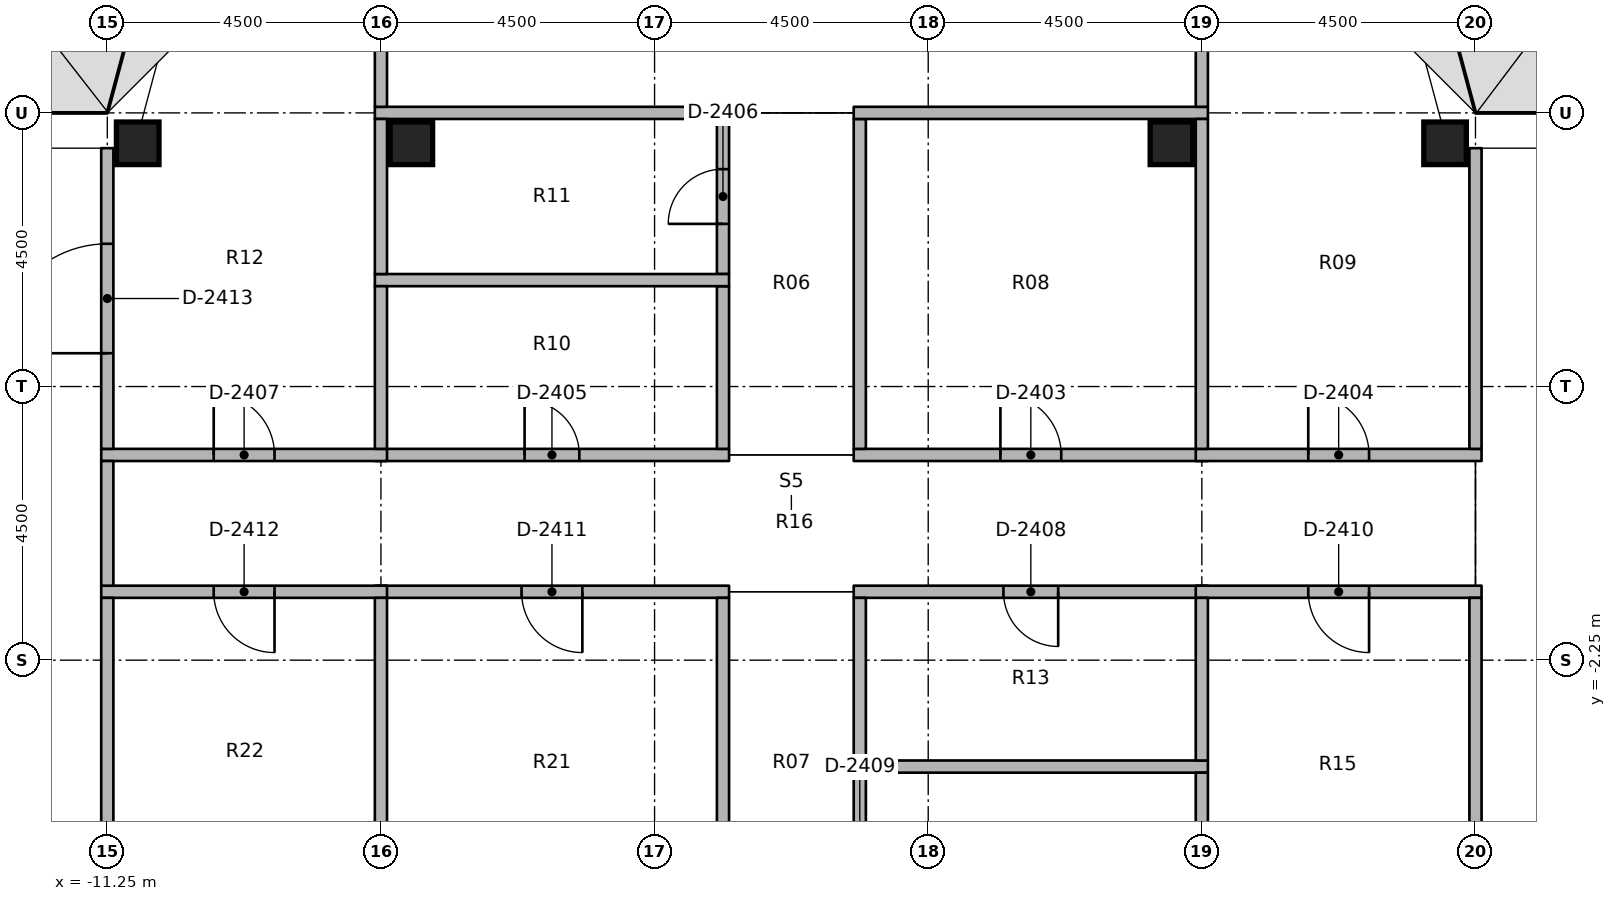
"""IFC4 building model, lengths in metres.
Left out: names, types, materials, properties, quantities, classifications, styles, units other than length and angle.
Written with IfcOpenShell. Run it as: python <this file> out.ifc"""

import sys

from ifc_helpers import new_model, si_unit, direction, frame, frame_2d, origin, origin_2d, place, context, subcontext, project, spatial, rectangle, extrude, element, fill, save


model = new_model("IFC4")
c1 = context("Model", 3, precision=1e-05, world=origin(), true_north=direction((0.0, 1.0)))
c2 = subcontext(c1, "Body", "Model", "MODEL_VIEW")
j1 = project(units=[si_unit("LENGTHUNIT", "METRE"), si_unit("PLANEANGLEUNIT", "RADIAN")], contexts=[c1])
p1 = place(None, origin())
s1 = spatial("IfcSite", under=j1, at=p1, CompositionType="ELEMENT")
p2 = place(p1, origin())
s2 = spatial("IfcBuilding", under=s1, at=p2, CompositionType="ELEMENT")
p3 = place(p2, frame((0.0, 0.0, 222.0)))
s3 = spatial("IfcBuildingStorey", under=s2, at=p3, CompositionType="ELEMENT", Elevation=222.0)
for number, where, z_axis, x_axis in (
    (1, (-10.75, 6.25, 0.0), (0.0, 0.0, 1.0), (1.0, 0.0, 0.0)),
    (2, (-6.25, 6.25, 0.0), (0.0, 0.0, 1.0), (1.0, 0.0, 0.0)),
    (3, (6.25, 6.25, 0.0), (0.0, 0.0, 1.0), (1.0, 0.0, 0.0)),
    (4, (10.75, 6.25, 0.0), (0.0, 0.0, 1.0), (1.0, 0.0, 0.0)),
):
    element("IfcColumn", number, at=place(p3, frame(where, z_axis=z_axis, x_axis=x_axis)), inside=s3, PredefinedType="COLUMN", context=c2, shape_type="SweptSolid", body=[
        extrude(rectangle(XDim=0.7, YDim=0.7, at=origin_2d()), origin(), (0.0, 0.0, 1.0), 3.65),
    ])
p4 = place(p3, frame((1.025, 1.125, 0.0), z_axis=(0.0, 0.0, 1.0), x_axis=(1.0, 0.0, 0.0)))
e5 = element("IfcWall", 5, at=p4, inside=s3, PredefinedType="PARTITIONING", context=c2, shape_type="SweptSolid", body=[
    extrude(rectangle(XDim=5.825, YDim=0.2, at=frame_2d((2.913, 0.0))), origin(), (0.0, 0.0, 1.0), 2.75),
])
p5 = place(p4, frame((2.413, 0.0, 0.0)))
e6 = element("IfcOpeningElement", 6, at=p5, cuts=e5, PredefinedType="OPENING", context=c2, shape_type="SweptSolid", body=[
    extrude(rectangle(XDim=1.0, YDim=2.1, at=frame_2d((0.5, 1.05))), frame((0.0, 0.11, 0.0), z_axis=(0.0, -1.0, 0.0), x_axis=(1.0, 0.0, 0.0)), (0.0, 0.0, 1.0), 0.22),
])
p6 = place(p3, frame((6.65, 1.125, 0.0), z_axis=(0.0, 0.0, 1.0), x_axis=(1.0, 0.0, 0.0)))
e7 = element("IfcWall", 7, at=p6, inside=s3, PredefinedType="PARTITIONING", context=c2, shape_type="SweptSolid", body=[
    extrude(rectangle(XDim=4.7, YDim=0.2, at=frame_2d((2.35, 0.0))), origin(), (0.0, 0.0, 1.0), 2.75),
])
p7 = place(p6, frame((1.85, 0.0, 0.0)))
e8 = element("IfcOpeningElement", 8, at=p7, cuts=e7, PredefinedType="OPENING", context=c2, shape_type="SweptSolid", body=[
    extrude(rectangle(XDim=1.0, YDim=2.1, at=frame_2d((0.5, 1.05))), frame((0.0, 0.11, 0.0), z_axis=(0.0, -1.0, 0.0), x_axis=(1.0, 0.0, 0.0)), (0.0, 0.0, 1.0), 0.22),
])
p8 = place(p3, frame((-6.85, 1.125, 0.0), z_axis=(0.0, 0.0, 1.0), x_axis=(1.0, 0.0, 0.0)))
e9 = element("IfcWall", 9, at=p8, inside=s3, PredefinedType="PARTITIONING", context=c2, shape_type="SweptSolid", body=[
    extrude(rectangle(XDim=5.825, YDim=0.2, at=frame_2d((2.913, 0.0))), origin(), (0.0, 0.0, 1.0), 2.75),
])
p9 = place(p8, frame((2.462, 0.0, 0.0)))
e10 = element("IfcOpeningElement", 10, at=p9, cuts=e9, PredefinedType="OPENING", context=c2, shape_type="SweptSolid", body=[
    extrude(rectangle(XDim=0.9, YDim=2.1, at=frame_2d((0.45, 1.05))), frame((0.0, 0.11, 0.0), z_axis=(0.0, -1.0, 0.0), x_axis=(1.0, 0.0, 0.0)), (0.0, 0.0, 1.0), 0.22),
])
p10 = place(p3, frame((-11.35, 1.125, 0.0), z_axis=(0.0, 0.0, 1.0), x_axis=(1.0, 0.0, 0.0)))
e11 = element("IfcWall", 11, at=p10, inside=s3, PredefinedType="PARTITIONING", context=c2, shape_type="SweptSolid", body=[
    extrude(rectangle(XDim=4.7, YDim=0.2, at=frame_2d((2.35, 0.0))), origin(), (0.0, 0.0, 1.0), 2.75),
])
p11 = place(p10, frame((1.85, 0.0, 0.0)))
e12 = element("IfcOpeningElement", 12, at=p11, cuts=e11, PredefinedType="OPENING", context=c2, shape_type="SweptSolid", body=[
    extrude(rectangle(XDim=1.0, YDim=2.1, at=frame_2d((0.5, 1.05))), frame((0.0, 0.11, 0.0), z_axis=(0.0, -1.0, 0.0), x_axis=(1.0, 0.0, 0.0)), (0.0, 0.0, 1.0), 0.22),
])
p12 = place(p3, frame((6.85, -1.125, 0.0), z_axis=(0.0, 0.0, 1.0), x_axis=(-1.0, 0.0, 0.0)))
e13 = element("IfcWall", 13, at=p12, inside=s3, PredefinedType="PARTITIONING", context=c2, shape_type="SweptSolid", body=[
    extrude(rectangle(XDim=5.825, YDim=0.2, at=frame_2d((2.913, 0.0))), origin(), (0.0, 0.0, 1.0), 2.75),
])
p13 = place(p12, frame((2.462, 0.0, 0.0)))
e14 = element("IfcOpeningElement", 14, at=p13, cuts=e13, PredefinedType="OPENING", context=c2, shape_type="SweptSolid", body=[
    extrude(rectangle(XDim=0.9, YDim=2.1, at=frame_2d((0.45, 1.05))), frame((0.0, 0.11, 0.0), z_axis=(0.0, -1.0, 0.0), x_axis=(1.0, 0.0, 0.0)), (0.0, 0.0, 1.0), 0.22),
])
p14 = place(p3, frame((11.35, -1.125, 0.0), z_axis=(0.0, 0.0, 1.0), x_axis=(-1.0, 0.0, 0.0)))
e15 = element("IfcWall", 15, at=p14, inside=s3, PredefinedType="PARTITIONING", context=c2, shape_type="SweptSolid", body=[
    extrude(rectangle(XDim=4.7, YDim=0.2, at=frame_2d((2.35, 0.0))), origin(), (0.0, 0.0, 1.0), 2.75),
])
p15 = place(p14, frame((1.85, 0.0, 0.0)))
e16 = element("IfcOpeningElement", 16, at=p15, cuts=e15, PredefinedType="OPENING", context=c2, shape_type="SweptSolid", body=[
    extrude(rectangle(XDim=1.0, YDim=2.1, at=frame_2d((0.5, 1.05))), frame((0.0, 0.11, 0.0), z_axis=(0.0, -1.0, 0.0), x_axis=(1.0, 0.0, 0.0)), (0.0, 0.0, 1.0), 0.22),
])
p16 = place(p3, frame((-1.025, -1.125, 0.0), z_axis=(0.0, 0.0, 1.0), x_axis=(-1.0, 0.0, 0.0)))
e17 = element("IfcWall", 17, at=p16, inside=s3, PredefinedType="PARTITIONING", context=c2, shape_type="SweptSolid", body=[
    extrude(rectangle(XDim=5.825, YDim=0.2, at=frame_2d((2.913, 0.0))), origin(), (0.0, 0.0, 1.0), 2.75),
])
p17 = place(p16, frame((2.413, 0.0, 0.0)))
e18 = element("IfcOpeningElement", 18, at=p17, cuts=e17, PredefinedType="OPENING", context=c2, shape_type="SweptSolid", body=[
    extrude(rectangle(XDim=1.0, YDim=2.1, at=frame_2d((0.5, 1.05))), frame((0.0, 0.11, 0.0), z_axis=(0.0, -1.0, 0.0), x_axis=(1.0, 0.0, 0.0)), (0.0, 0.0, 1.0), 0.22),
])
p18 = place(p3, frame((-6.65, -1.125, 0.0), z_axis=(0.0, 0.0, 1.0), x_axis=(-1.0, 0.0, 0.0)))
e19 = element("IfcWall", 19, at=p18, inside=s3, PredefinedType="PARTITIONING", context=c2, shape_type="SweptSolid", body=[
    extrude(rectangle(XDim=4.7, YDim=0.2, at=frame_2d((2.35, 0.0))), origin(), (0.0, 0.0, 1.0), 2.75),
])
p19 = place(p18, frame((1.85, 0.0, 0.0)))
e20 = element("IfcOpeningElement", 20, at=p19, cuts=e19, PredefinedType="OPENING", context=c2, shape_type="SweptSolid", body=[
    extrude(rectangle(XDim=1.0, YDim=2.1, at=frame_2d((0.5, 1.05))), frame((0.0, 0.11, 0.0), z_axis=(0.0, -1.0, 0.0), x_axis=(1.0, 0.0, 0.0)), (0.0, 0.0, 1.0), 0.22),
])
p20 = place(p3, frame((-11.25, -1.025, 0.0), z_axis=(0.0, 0.0, 1.0), x_axis=(0.0, 1.0, 0.0)))
e21 = element("IfcWall", 21, at=p20, inside=s3, PredefinedType="PARTITIONING", context=c2, shape_type="SweptSolid", body=[
    extrude(rectangle(XDim=2.05, YDim=0.2, at=frame_2d((1.025, 0.0))), origin(), (0.0, 0.0, 1.0), 2.75),
])
p21 = place(p3, frame((1.125, 1.225, 0.0), z_axis=(0.0, 0.0, 1.0), x_axis=(0.0, 1.0, 0.0)))
e22 = element("IfcWall", 22, at=p21, inside=s3, PredefinedType="PARTITIONING", context=c2, shape_type="SweptSolid", body=[
    extrude(rectangle(XDim=5.425, YDim=0.2, at=frame_2d((2.712, 0.0))), origin(), (0.0, 0.0, 1.0), 2.75),
])
p22 = place(p3, frame((-1.125, 1.225, 0.0), z_axis=(0.0, 0.0, 1.0), x_axis=(0.0, 1.0, 0.0)))
e23 = element("IfcWall", 23, at=p22, inside=s3, PredefinedType="PARTITIONING", context=c2, shape_type="SweptSolid", body=[
    extrude(rectangle(XDim=2.675, YDim=0.2, at=frame_2d((1.337, 0.0))), origin(), (0.0, 0.0, 1.0), 2.75),
])
p23 = place(p3, frame((-1.125, 4.1, 0.0), z_axis=(0.0, 0.0, 1.0), x_axis=(0.0, 1.0, 0.0)))
e24 = element("IfcWall", 24, at=p23, inside=s3, PredefinedType="PARTITIONING", context=c2, shape_type="SweptSolid", body=[
    extrude(rectangle(XDim=2.55, YDim=0.2, at=frame_2d((1.275, 0.0))), origin(), (0.0, 0.0, 1.0), 2.75),
])
p24 = place(p23, frame((0.825, 0.0, 0.0)))
e25 = element("IfcOpeningElement", 25, at=p24, cuts=e24, PredefinedType="OPENING", context=c2, shape_type="SweptSolid", body=[
    extrude(rectangle(XDim=0.9, YDim=2.1, at=frame_2d((0.45, 1.05))), frame((0.0, 0.11, 0.0), z_axis=(0.0, -1.0, 0.0), x_axis=(1.0, 0.0, 0.0)), (0.0, 0.0, 1.0), 0.22),
])
p25 = place(p3, frame((1.125, -3.9, 0.0), z_axis=(0.0, 0.0, 1.0), x_axis=(0.0, 1.0, 0.0)))
e26 = element("IfcWall", 26, at=p25, inside=s3, PredefinedType="PARTITIONING", context=c2, shape_type="SweptSolid", body=[
    extrude(rectangle(XDim=2.675, YDim=0.2, at=frame_2d((1.337, 0.0))), origin(), (0.0, 0.0, 1.0), 2.75),
])
p26 = place(p3, frame((1.125, -4.1, 0.0), z_axis=(0.0, 0.0, 1.0), x_axis=(0.0, -1.0, 0.0)))
e27 = element("IfcWall", 27, at=p26, inside=s3, PredefinedType="PARTITIONING", context=c2, shape_type="SweptSolid", body=[
    extrude(rectangle(XDim=2.55, YDim=0.2, at=frame_2d((1.275, 0.0))), origin(), (0.0, 0.0, 1.0), 2.75),
])
p27 = place(p26, frame((0.825, 0.0, 0.0)))
e28 = element("IfcOpeningElement", 28, at=p27, cuts=e27, PredefinedType="OPENING", context=c2, shape_type="SweptSolid", body=[
    extrude(rectangle(XDim=0.9, YDim=2.1, at=frame_2d((0.45, 1.05))), frame((0.0, 0.11, 0.0), z_axis=(0.0, -1.0, 0.0), x_axis=(1.0, 0.0, 0.0)), (0.0, 0.0, 1.0), 0.22),
])
p28 = place(p3, frame((-1.125, -6.65, 0.0), z_axis=(0.0, 0.0, 1.0), x_axis=(0.0, 1.0, 0.0)))
e29 = element("IfcWall", 29, at=p28, inside=s3, PredefinedType="PARTITIONING", context=c2, shape_type="SweptSolid", body=[
    extrude(rectangle(XDim=5.425, YDim=0.2, at=frame_2d((2.712, 0.0))), origin(), (0.0, 0.0, 1.0), 2.75),
])
p29 = place(p3, frame((1.025, 6.75, 0.0), z_axis=(0.0, 0.0, 1.0), x_axis=(1.0, 0.0, 0.0)))
e30 = element("IfcWall", 30, at=p29, inside=s3, PredefinedType="PARTITIONING", context=c2, shape_type="SweptSolid", body=[
    extrude(rectangle(XDim=5.825, YDim=0.2, at=frame_2d((2.913, 0.0))), origin(), (0.0, 0.0, 1.0), 2.75),
])
p30 = place(p3, frame((6.75, 6.85, 0.0), z_axis=(0.0, 0.0, 1.0), x_axis=(0.0, 1.0, 0.0)))
e31 = element("IfcWall", 31, at=p30, inside=s3, PredefinedType="PARTITIONING", context=c2, shape_type="SweptSolid", body=[
    extrude(rectangle(XDim=3.78, YDim=0.2, at=frame_2d((1.89, 0.0))), origin(), (0.0, 0.0, 1.0), 2.75),
])
p31 = place(p3, frame((-6.85, 6.75, 0.0), z_axis=(0.0, 0.0, 1.0), x_axis=(1.0, 0.0, 0.0)))
e32 = element("IfcWall", 32, at=p31, inside=s3, PredefinedType="PARTITIONING", context=c2, shape_type="SweptSolid", body=[
    extrude(rectangle(XDim=5.825, YDim=0.2, at=frame_2d((2.913, 0.0))), origin(), (0.0, 0.0, 1.0), 2.75),
])
p32 = place(p3, frame((-6.75, 6.85, 0.0), z_axis=(0.0, 0.0, 1.0), x_axis=(0.0, 1.0, 0.0)))
e33 = element("IfcWall", 33, at=p32, inside=s3, PredefinedType="PARTITIONING", context=c2, shape_type="SweptSolid", body=[
    extrude(rectangle(XDim=3.78, YDim=0.2, at=frame_2d((1.89, 0.0))), origin(), (0.0, 0.0, 1.0), 2.75),
])
p33 = place(p3, frame((6.75, 1.225, 0.0), z_axis=(0.0, 0.0, 1.0), x_axis=(0.0, 1.0, 0.0)))
e34 = element("IfcWall", 34, at=p33, inside=s3, PredefinedType="PARTITIONING", context=c2, shape_type="SweptSolid", body=[
    extrude(rectangle(XDim=5.425, YDim=0.2, at=frame_2d((2.712, 0.0))), origin(), (0.0, 0.0, 1.0), 2.75),
])
p34 = place(p3, frame((11.25, 1.225, 0.0), z_axis=(0.0, 0.0, 1.0), x_axis=(0.0, 1.0, 0.0)))
e35 = element("IfcWall", 35, at=p34, inside=s3, PredefinedType="PARTITIONING", context=c2, shape_type="SweptSolid", body=[
    extrude(rectangle(XDim=4.945, YDim=0.2, at=frame_2d((2.472, 0.0))), origin(), (0.0, 0.0, 1.0), 2.75),
])
p35 = place(p3, frame((-6.85, 4.0, 0.0), z_axis=(0.0, 0.0, 1.0), x_axis=(1.0, 0.0, 0.0)))
e36 = element("IfcWall", 36, at=p35, inside=s3, PredefinedType="PARTITIONING", context=c2, shape_type="SweptSolid", body=[
    extrude(rectangle(XDim=5.825, YDim=0.2, at=frame_2d((2.913, 0.0))), origin(), (0.0, 0.0, 1.0), 2.75),
])
p36 = place(p3, frame((-6.75, 1.225, 0.0), z_axis=(0.0, 0.0, 1.0), x_axis=(0.0, 1.0, 0.0)))
e37 = element("IfcWall", 37, at=p36, inside=s3, PredefinedType="PARTITIONING", context=c2, shape_type="SweptSolid", body=[
    extrude(rectangle(XDim=2.675, YDim=0.2, at=frame_2d((1.337, 0.0))), origin(), (0.0, 0.0, 1.0), 2.75),
])
p37 = place(p3, frame((-6.75, 4.1, 0.0), z_axis=(0.0, 0.0, 1.0), x_axis=(0.0, 1.0, 0.0)))
e38 = element("IfcWall", 38, at=p37, inside=s3, PredefinedType="PARTITIONING", context=c2, shape_type="SweptSolid", body=[
    extrude(rectangle(XDim=2.55, YDim=0.2, at=frame_2d((1.275, 0.0))), origin(), (0.0, 0.0, 1.0), 2.75),
])
p38 = place(p3, frame((-11.25, 1.225, 0.0), z_axis=(0.0, 0.0, 1.0), x_axis=(0.0, 1.0, 0.0)))
e39 = element("IfcWall", 39, at=p38, inside=s3, PredefinedType="PARTITIONING", context=c2, shape_type="SweptSolid", body=[
    extrude(rectangle(XDim=4.945, YDim=0.2, at=frame_2d((2.472, 0.0))), origin(), (0.0, 0.0, 1.0), 2.75),
])
p39 = place(p38, frame((1.573, 0.0, 0.0)))
e40 = element("IfcOpeningElement", 40, at=p39, cuts=e39, PredefinedType="OPENING", context=c2, shape_type="SweptSolid", body=[
    extrude(rectangle(XDim=1.8, YDim=2.1, at=frame_2d((0.9, 1.05))), frame((0.0, 0.11, 0.0), z_axis=(0.0, -1.0, 0.0), x_axis=(1.0, 0.0, 0.0)), (0.0, 0.0, 1.0), 0.22),
])
p40 = place(p3, frame((1.025, -4.0, 0.0), z_axis=(0.0, 0.0, 1.0), x_axis=(1.0, 0.0, 0.0)))
e41 = element("IfcWall", 41, at=p40, inside=s3, PredefinedType="PARTITIONING", context=c2, shape_type="SweptSolid", body=[
    extrude(rectangle(XDim=5.825, YDim=0.2, at=frame_2d((2.913, 0.0))), origin(), (0.0, 0.0, 1.0), 2.75),
])
p41 = place(p3, frame((6.75, -3.9, 0.0), z_axis=(0.0, 0.0, 1.0), x_axis=(0.0, 1.0, 0.0)))
e42 = element("IfcWall", 42, at=p41, inside=s3, PredefinedType="PARTITIONING", context=c2, shape_type="SweptSolid", body=[
    extrude(rectangle(XDim=2.675, YDim=0.2, at=frame_2d((1.337, 0.0))), origin(), (0.0, 0.0, 1.0), 2.75),
])
p42 = place(p3, frame((6.75, -6.65, 0.0), z_axis=(0.0, 0.0, 1.0), x_axis=(0.0, 1.0, 0.0)))
e43 = element("IfcWall", 43, at=p42, inside=s3, PredefinedType="PARTITIONING", context=c2, shape_type="SweptSolid", body=[
    extrude(rectangle(XDim=2.55, YDim=0.2, at=frame_2d((1.275, 0.0))), origin(), (0.0, 0.0, 1.0), 2.75),
])
p43 = place(p3, frame((11.25, -6.17, 0.0), z_axis=(0.0, 0.0, 1.0), x_axis=(0.0, 1.0, 0.0)))
e44 = element("IfcWall", 44, at=p43, inside=s3, PredefinedType="PARTITIONING", context=c2, shape_type="SweptSolid", body=[
    extrude(rectangle(XDim=4.945, YDim=0.2, at=frame_2d((2.472, 0.0))), origin(), (0.0, 0.0, 1.0), 2.75),
])
p44 = place(p3, frame((-6.75, -6.65, 0.0), z_axis=(0.0, 0.0, 1.0), x_axis=(0.0, 1.0, 0.0)))
e45 = element("IfcWall", 45, at=p44, inside=s3, PredefinedType="PARTITIONING", context=c2, shape_type="SweptSolid", body=[
    extrude(rectangle(XDim=5.425, YDim=0.2, at=frame_2d((2.712, 0.0))), origin(), (0.0, 0.0, 1.0), 2.75),
])
p45 = place(p3, frame((-11.25, -6.17, 0.0), z_axis=(0.0, 0.0, 1.0), x_axis=(0.0, 1.0, 0.0)))
e46 = element("IfcWall", 46, at=p45, inside=s3, PredefinedType="PARTITIONING", context=c2, shape_type="SweptSolid", body=[
    extrude(rectangle(XDim=4.945, YDim=0.2, at=frame_2d((2.472, 0.0))), origin(), (0.0, 0.0, 1.0), 2.75),
])
p46 = place(p5, origin())
e47 = element("IfcDoor", 47, at=p46, inside=s3, OperationType="SINGLE_SWING_RIGHT", PredefinedType="DOOR", context=c2, shape_type="SweptSolid", body=[
    extrude(rectangle(XDim=1.0, YDim=2.1, at=frame_2d((0.5, 1.05))), frame((0.0, 0.025, 0.0), z_axis=(0.0, -1.0, 0.0), x_axis=(1.0, 0.0, 0.0)), (0.0, 0.0, 1.0), 0.05),
])
fill(e6, e47)
p47 = place(p7, origin())
e48 = element("IfcDoor", 48, at=p47, inside=s3, OperationType="SINGLE_SWING_RIGHT", PredefinedType="DOOR", context=c2, shape_type="SweptSolid", body=[
    extrude(rectangle(XDim=1.0, YDim=2.1, at=frame_2d((0.5, 1.05))), frame((0.0, 0.025, 0.0), z_axis=(0.0, -1.0, 0.0), x_axis=(1.0, 0.0, 0.0)), (0.0, 0.0, 1.0), 0.05),
])
fill(e8, e48)
p48 = place(p9, origin())
e49 = element("IfcDoor", 49, at=p48, inside=s3, OperationType="SINGLE_SWING_RIGHT", PredefinedType="DOOR", context=c2, shape_type="SweptSolid", body=[
    extrude(rectangle(XDim=0.9, YDim=2.1, at=frame_2d((0.45, 1.05))), frame((0.0, 0.025, 0.0), z_axis=(0.0, -1.0, 0.0), x_axis=(1.0, 0.0, 0.0)), (0.0, 0.0, 1.0), 0.05),
])
fill(e10, e49)
p49 = place(p24, origin())
e50 = element("IfcDoor", 50, at=p49, inside=s3, OperationType="SINGLE_SWING_RIGHT", PredefinedType="DOOR", context=c2, shape_type="SweptSolid", body=[
    extrude(rectangle(XDim=0.9, YDim=2.1, at=frame_2d((0.45, 1.05))), frame((0.0, 0.025, 0.0), z_axis=(0.0, -1.0, 0.0), x_axis=(1.0, 0.0, 0.0)), (0.0, 0.0, 1.0), 0.05),
])
fill(e25, e50)
p50 = place(p11, origin())
e51 = element("IfcDoor", 51, at=p50, inside=s3, OperationType="SINGLE_SWING_RIGHT", PredefinedType="DOOR", context=c2, shape_type="SweptSolid", body=[
    extrude(rectangle(XDim=1.0, YDim=2.1, at=frame_2d((0.5, 1.05))), frame((0.0, 0.025, 0.0), z_axis=(0.0, -1.0, 0.0), x_axis=(1.0, 0.0, 0.0)), (0.0, 0.0, 1.0), 0.05),
])
fill(e12, e51)
p51 = place(p13, origin())
e52 = element("IfcDoor", 52, at=p51, inside=s3, OperationType="SINGLE_SWING_RIGHT", PredefinedType="DOOR", context=c2, shape_type="SweptSolid", body=[
    extrude(rectangle(XDim=0.9, YDim=2.1, at=frame_2d((0.45, 1.05))), frame((0.0, 0.025, 0.0), z_axis=(0.0, -1.0, 0.0), x_axis=(1.0, 0.0, 0.0)), (0.0, 0.0, 1.0), 0.05),
])
fill(e14, e52)
p52 = place(p15, origin())
e53 = element("IfcDoor", 53, at=p52, inside=s3, OperationType="SINGLE_SWING_RIGHT", PredefinedType="DOOR", context=c2, shape_type="SweptSolid", body=[
    extrude(rectangle(XDim=1.0, YDim=2.1, at=frame_2d((0.5, 1.05))), frame((0.0, 0.025, 0.0), z_axis=(0.0, -1.0, 0.0), x_axis=(1.0, 0.0, 0.0)), (0.0, 0.0, 1.0), 0.05),
])
fill(e16, e53)
p53 = place(p17, origin())
e54 = element("IfcDoor", 54, at=p53, inside=s3, OperationType="SINGLE_SWING_RIGHT", PredefinedType="DOOR", context=c2, shape_type="SweptSolid", body=[
    extrude(rectangle(XDim=1.0, YDim=2.1, at=frame_2d((0.5, 1.05))), frame((0.0, 0.025, 0.0), z_axis=(0.0, -1.0, 0.0), x_axis=(1.0, 0.0, 0.0)), (0.0, 0.0, 1.0), 0.05),
])
fill(e18, e54)
p54 = place(p19, origin())
e55 = element("IfcDoor", 55, at=p54, inside=s3, OperationType="SINGLE_SWING_RIGHT", PredefinedType="DOOR", context=c2, shape_type="SweptSolid", body=[
    extrude(rectangle(XDim=1.0, YDim=2.1, at=frame_2d((0.5, 1.05))), frame((0.0, 0.025, 0.0), z_axis=(0.0, -1.0, 0.0), x_axis=(1.0, 0.0, 0.0)), (0.0, 0.0, 1.0), 0.05),
])
fill(e20, e55)
p55 = place(p39, origin())
e56 = element("IfcDoor", 56, at=p55, inside=s3, OperationType="DOUBLE_DOOR_SINGLE_SWING", PredefinedType="DOOR", context=c2, shape_type="SweptSolid", body=[
    extrude(rectangle(XDim=1.8, YDim=2.1, at=frame_2d((0.9, 1.05))), frame((0.0, 0.025, 0.0), z_axis=(0.0, -1.0, 0.0), x_axis=(1.0, 0.0, 0.0)), (0.0, 0.0, 1.0), 0.05),
])
fill(e40, e56)
save(model, sys.argv[1])
